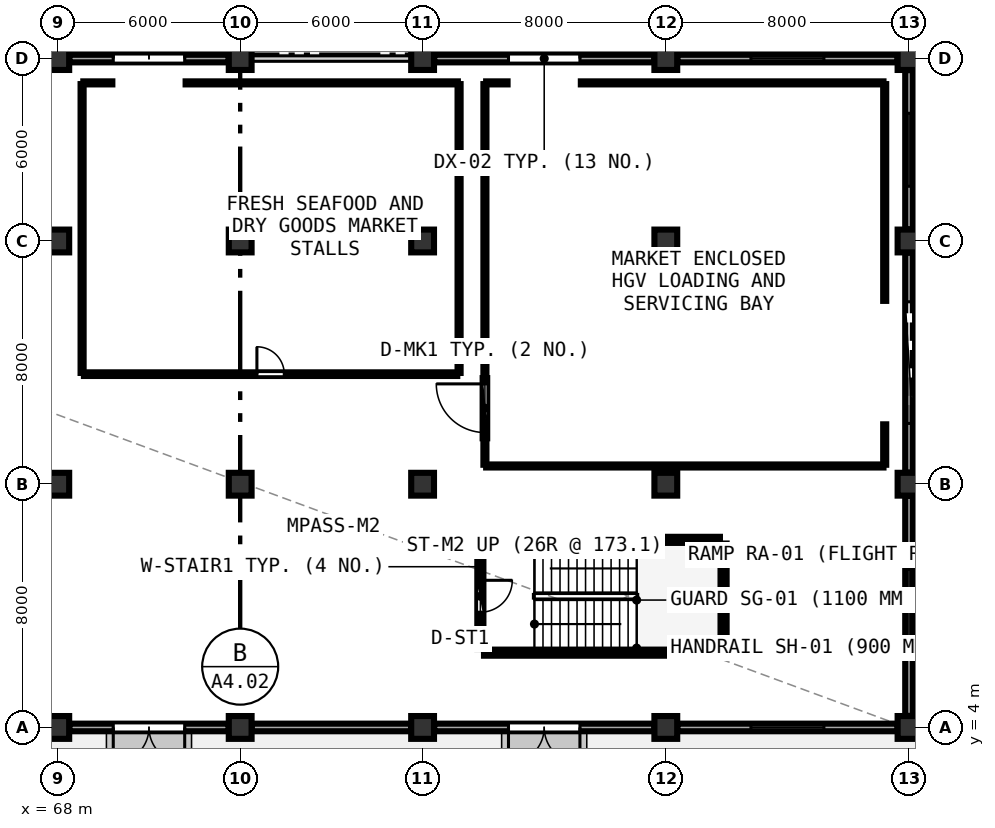
"""IFC4 building model, lengths in metres.
Left out: names, types, materials, properties, quantities, classifications, styles, units other than length and angle.
Written with IfcOpenShell. Run it as: python <this file> out.ifc"""

import sys

from ifc_helpers import new_model, si_unit, direction, frame, frame_2d, origin, origin_2d, place, context, subcontext, project, spatial, rectangle, extrude, element, fill, save


model = new_model("IFC4")
c1 = context("Model", 3, precision=1e-05, world=origin(), true_north=direction((0.0, 1.0)))
c2 = subcontext(c1, "Body", "Model", "MODEL_VIEW")
j1 = project(units=[si_unit("LENGTHUNIT", "METRE"), si_unit("PLANEANGLEUNIT", "RADIAN")], contexts=[c1])
p1 = place(None, origin())
s1 = spatial("IfcSite", under=j1, at=p1, CompositionType="ELEMENT")
p2 = place(p1, origin())
s2 = spatial("IfcBuilding", under=s1, at=p2, CompositionType="ELEMENT")
p3 = place(p2, origin())
s3 = spatial("IfcBuildingStorey", under=s2, at=p3, CompositionType="ELEMENT", Elevation=0.0)
for number, where, z_axis, x_axis in (
    (1, (68.0, 4.0, 0.0), (0.0, 0.0, 1.0), (1.0, 0.0, 0.0)),
    (2, (68.0, 12.0, 0.0), (0.0, 0.0, 1.0), (1.0, 0.0, 0.0)),
    (3, (68.0, 20.0, 0.0), (0.0, 0.0, 1.0), (1.0, 0.0, 0.0)),
    (4, (68.0, 26.0, 0.0), (0.0, 0.0, 1.0), (1.0, 0.0, 0.0)),
    (5, (74.0, 4.0, 0.0), (0.0, 0.0, 1.0), (1.0, 0.0, 0.0)),
    (6, (74.0, 12.0, 0.0), (0.0, 0.0, 1.0), (1.0, 0.0, 0.0)),
    (7, (74.0, 20.0, 0.0), (0.0, 0.0, 1.0), (1.0, 0.0, 0.0)),
    (8, (74.0, 26.0, 0.0), (0.0, 0.0, 1.0), (1.0, 0.0, 0.0)),
    (9, (80.0, 4.0, 0.0), (0.0, 0.0, 1.0), (1.0, 0.0, 0.0)),
    (10, (80.0, 12.0, 0.0), (0.0, 0.0, 1.0), (1.0, 0.0, 0.0)),
    (11, (80.0, 20.0, 0.0), (0.0, 0.0, 1.0), (1.0, 0.0, 0.0)),
    (12, (80.0, 26.0, 0.0), (0.0, 0.0, 1.0), (1.0, 0.0, 0.0)),
    (13, (88.0, 4.0, 0.0), (0.0, 0.0, 1.0), (1.0, 0.0, 0.0)),
    (14, (88.0, 12.0, 0.0), (0.0, 0.0, 1.0), (1.0, 0.0, 0.0)),
    (15, (88.0, 20.0, 0.0), (0.0, 0.0, 1.0), (1.0, 0.0, 0.0)),
    (16, (88.0, 26.0, 0.0), (0.0, 0.0, 1.0), (1.0, 0.0, 0.0)),
    (17, (96.0, 4.0, 0.0), (0.0, 0.0, 1.0), (1.0, 0.0, 0.0)),
    (18, (96.0, 12.0, 0.0), (0.0, 0.0, 1.0), (1.0, 0.0, 0.0)),
    (19, (96.0, 20.0, 0.0), (0.0, 0.0, 1.0), (1.0, 0.0, 0.0)),
    (20, (96.0, 26.0, 0.0), (0.0, 0.0, 1.0), (1.0, 0.0, 0.0)),
):
    element("IfcColumn", number, at=place(p3, frame(where, z_axis=z_axis, x_axis=x_axis)), inside=s3, PredefinedType="COLUMN", context=c2, shape_type="SweptSolid", body=[
        extrude(rectangle(XDim=0.75, YDim=0.75, at=origin_2d()), origin(), (0.0, 0.0, 1.0), 4.5),
    ])
p4 = place(p3, frame((68.38, 4.0, 0.0), z_axis=(0.0, 0.0, 1.0), x_axis=(1.0, 0.0, 0.0)))
e21 = element("IfcWall", 21, at=p4, inside=s3, PredefinedType="SOLIDWALL", context=c2, shape_type="SweptSolid", body=[
    extrude(rectangle(XDim=5.24, YDim=0.25, at=frame_2d((2.62, 0.0))), origin(), (0.0, 0.0, 1.0), 3.42),
])
p5 = place(p4, frame((1.445, 0.0, 0.0)))
e22 = element("IfcOpeningElement", 22, at=p5, cuts=e21, PredefinedType="OPENING", context=c2, shape_type="SweptSolid", body=[
    extrude(rectangle(XDim=2.35, YDim=2.3, at=frame_2d((1.175, 1.15))), frame((0.0, 0.135, 0.0), z_axis=(0.0, -1.0, 0.0), x_axis=(1.0, 0.0, 0.0)), (0.0, 0.0, 1.0), 0.27),
])
p6 = place(p3, frame((74.38, 4.0, 0.0), z_axis=(0.0, 0.0, 1.0), x_axis=(1.0, 0.0, 0.0)))
e23 = element("IfcWall", 23, at=p6, inside=s3, PredefinedType="SOLIDWALL", context=c2, shape_type="SweptSolid", body=[
    extrude(rectangle(XDim=5.24, YDim=0.25, at=frame_2d((2.62, 0.0))), origin(), (0.0, 0.0, 1.0), 3.42),
])
p7 = place(p3, frame((80.38, 4.0, 0.0), z_axis=(0.0, 0.0, 1.0), x_axis=(1.0, 0.0, 0.0)))
e24 = element("IfcWall", 24, at=p7, inside=s3, PredefinedType="SOLIDWALL", context=c2, shape_type="SweptSolid", body=[
    extrude(rectangle(XDim=7.24, YDim=0.25, at=frame_2d((3.62, 0.0))), origin(), (0.0, 0.0, 1.0), 3.42),
])
p8 = place(p7, frame((2.445, 0.0, 0.0)))
e25 = element("IfcOpeningElement", 25, at=p8, cuts=e24, PredefinedType="OPENING", context=c2, shape_type="SweptSolid", body=[
    extrude(rectangle(XDim=2.35, YDim=2.3, at=frame_2d((1.175, 1.15))), frame((0.0, 0.135, 0.0), z_axis=(0.0, -1.0, 0.0), x_axis=(1.0, 0.0, 0.0)), (0.0, 0.0, 1.0), 0.27),
])
p9 = place(p3, frame((88.38, 4.0, 0.0), z_axis=(0.0, 0.0, 1.0), x_axis=(1.0, 0.0, 0.0)))
e26 = element("IfcWall", 26, at=p9, inside=s3, PredefinedType="SOLIDWALL", context=c2, shape_type="SweptSolid", body=[
    extrude(rectangle(XDim=7.24, YDim=0.25, at=frame_2d((3.62, 0.0))), origin(), (0.0, 0.0, 1.0), 3.42),
])
p10 = place(p9, frame((2.42, 0.0, 0.95)))
e27 = element("IfcOpeningElement", 27, at=p10, cuts=e26, PredefinedType="OPENING", context=c2, shape_type="SweptSolid", body=[
    extrude(rectangle(XDim=2.4, YDim=1.65, at=frame_2d((1.2, 0.825))), frame((0.0, 0.135, 0.0), z_axis=(0.0, -1.0, 0.0), x_axis=(1.0, 0.0, 0.0)), (0.0, 0.0, 1.0), 0.27),
])
p11 = place(p3, frame((96.0, 4.38, 0.0), z_axis=(0.0, 0.0, 1.0), x_axis=(0.0, 1.0, 0.0)))
e28 = element("IfcWall", 28, at=p11, inside=s3, PredefinedType="SOLIDWALL", context=c2, shape_type="SweptSolid", body=[
    extrude(rectangle(XDim=7.24, YDim=0.25, at=frame_2d((3.62, 0.0))), origin(), (0.0, 0.0, 1.0), 3.42),
])
p12 = place(p11, frame((2.42, 0.0, 0.95)))
e29 = element("IfcOpeningElement", 29, at=p12, cuts=e28, PredefinedType="OPENING", context=c2, shape_type="SweptSolid", body=[
    extrude(rectangle(XDim=2.4, YDim=1.65, at=frame_2d((1.2, 0.825))), frame((0.0, 0.135, 0.0), z_axis=(0.0, -1.0, 0.0), x_axis=(1.0, 0.0, 0.0)), (0.0, 0.0, 1.0), 0.27),
])
p13 = place(p3, frame((96.0, 12.38, 0.0), z_axis=(0.0, 0.0, 1.0), x_axis=(0.0, 1.0, 0.0)))
e30 = element("IfcWall", 30, at=p13, inside=s3, PredefinedType="SOLIDWALL", context=c2, shape_type="SweptSolid", body=[
    extrude(rectangle(XDim=7.24, YDim=0.25, at=frame_2d((3.62, 0.0))), origin(), (0.0, 0.0, 1.0), 3.42),
])
p14 = place(p13, frame((1.62, 0.0, 0.0)))
e31 = element("IfcOpeningElement", 31, at=p14, cuts=e30, PredefinedType="OPENING", context=c2, shape_type="SweptSolid", body=[
    extrude(rectangle(XDim=4.0, YDim=3.2, at=frame_2d((2.0, 1.6))), frame((0.0, 0.135, 0.0), z_axis=(0.0, -1.0, 0.0), x_axis=(1.0, 0.0, 0.0)), (0.0, 0.0, 1.0), 0.27),
])
p15 = place(p3, frame((96.0, 20.38, 0.0), z_axis=(0.0, 0.0, 1.0), x_axis=(0.0, 1.0, 0.0)))
e32 = element("IfcWall", 32, at=p15, inside=s3, PredefinedType="SOLIDWALL", context=c2, shape_type="SweptSolid", body=[
    extrude(rectangle(XDim=5.24, YDim=0.25, at=frame_2d((2.62, 0.0))), origin(), (0.0, 0.0, 1.0), 3.42),
])
p16 = place(p15, frame((1.42, 0.0, 0.95)))
e33 = element("IfcOpeningElement", 33, at=p16, cuts=e32, PredefinedType="OPENING", context=c2, shape_type="SweptSolid", body=[
    extrude(rectangle(XDim=2.4, YDim=1.65, at=frame_2d((1.2, 0.825))), frame((0.0, 0.135, 0.0), z_axis=(0.0, -1.0, 0.0), x_axis=(1.0, 0.0, 0.0)), (0.0, 0.0, 1.0), 0.27),
])
p17 = place(p3, frame((95.62, 26.0, 0.0), z_axis=(0.0, 0.0, 1.0), x_axis=(-1.0, 0.0, 0.0)))
e34 = element("IfcWall", 34, at=p17, inside=s3, PredefinedType="SOLIDWALL", context=c2, shape_type="SweptSolid", body=[
    extrude(rectangle(XDim=7.24, YDim=0.25, at=frame_2d((3.62, 0.0))), origin(), (0.0, 0.0, 1.0), 3.42),
])
p18 = place(p17, frame((2.42, 0.0, 0.95)))
e35 = element("IfcOpeningElement", 35, at=p18, cuts=e34, PredefinedType="OPENING", context=c2, shape_type="SweptSolid", body=[
    extrude(rectangle(XDim=2.4, YDim=1.65, at=frame_2d((1.2, 0.825))), frame((0.0, 0.135, 0.0), z_axis=(0.0, -1.0, 0.0), x_axis=(1.0, 0.0, 0.0)), (0.0, 0.0, 1.0), 0.27),
])
p19 = place(p3, frame((87.62, 26.0, 0.0), z_axis=(0.0, 0.0, 1.0), x_axis=(-1.0, 0.0, 0.0)))
e36 = element("IfcWall", 36, at=p19, inside=s3, PredefinedType="SOLIDWALL", context=c2, shape_type="SweptSolid", body=[
    extrude(rectangle(XDim=7.24, YDim=0.25, at=frame_2d((3.62, 0.0))), origin(), (0.0, 0.0, 1.0), 3.42),
])
p20 = place(p19, frame((2.445, 0.0, 0.0)))
e37 = element("IfcOpeningElement", 37, at=p20, cuts=e36, PredefinedType="OPENING", context=c2, shape_type="SweptSolid", body=[
    extrude(rectangle(XDim=2.35, YDim=2.3, at=frame_2d((1.175, 1.15))), frame((0.0, 0.135, 0.0), z_axis=(0.0, -1.0, 0.0), x_axis=(1.0, 0.0, 0.0)), (0.0, 0.0, 1.0), 0.27),
])
p21 = place(p3, frame((73.62, 26.0, 0.0), z_axis=(0.0, 0.0, 1.0), x_axis=(-1.0, 0.0, 0.0)))
e38 = element("IfcWall", 38, at=p21, inside=s3, PredefinedType="SOLIDWALL", context=c2, shape_type="SweptSolid", body=[
    extrude(rectangle(XDim=5.24, YDim=0.25, at=frame_2d((2.62, 0.0))), origin(), (0.0, 0.0, 1.0), 3.42),
])
p22 = place(p21, frame((1.445, 0.0, 0.0)))
e39 = element("IfcOpeningElement", 39, at=p22, cuts=e38, PredefinedType="OPENING", context=c2, shape_type="SweptSolid", body=[
    extrude(rectangle(XDim=2.35, YDim=2.3, at=frame_2d((1.175, 1.15))), frame((0.0, 0.135, 0.0), z_axis=(0.0, -1.0, 0.0), x_axis=(1.0, 0.0, 0.0)), (0.0, 0.0, 1.0), 0.27),
])
p23 = place(p3, frame((82.02, 6.46, 0.0), z_axis=(0.0, 0.0, 1.0), x_axis=(1.0, 0.0, 0.0)))
e40 = element("IfcWall", 40, at=p23, inside=s3, PredefinedType="SHEAR", context=c2, shape_type="SweptSolid", body=[
    extrude(rectangle(XDim=7.76, YDim=0.2, at=frame_2d((3.88, 0.0))), origin(), (0.0, 0.0, 1.0), 4.24),
])
p24 = place(p3, frame((89.9, 6.58, 0.0), z_axis=(0.0, 0.0, 1.0), x_axis=(0.0, 1.0, 0.0)))
e41 = element("IfcWall", 41, at=p24, inside=s3, PredefinedType="SHEAR", context=c2, shape_type="SweptSolid", body=[
    extrude(rectangle(XDim=3.47, YDim=0.2, at=frame_2d((1.735, 0.0))), origin(), (0.0, 0.0, 1.0), 4.24),
])
p25 = place(p3, frame((89.78, 10.17, 0.0), z_axis=(0.0, 0.0, 1.0), x_axis=(-1.0, 0.0, 0.0)))
e42 = element("IfcWall", 42, at=p25, inside=s3, PredefinedType="SHEAR", context=c2, shape_type="SweptSolid", body=[
    extrude(rectangle(XDim=7.76, YDim=0.2, at=frame_2d((3.88, 0.0))), origin(), (0.0, 0.0, 1.0), 4.24),
])
p26 = place(p3, frame((81.9, 10.05, 0.0), z_axis=(0.0, 0.0, 1.0), x_axis=(0.0, -1.0, 0.0)))
e43 = element("IfcWall", 43, at=p26, inside=s3, PredefinedType="SHEAR", context=c2, shape_type="SweptSolid", body=[
    extrude(rectangle(XDim=3.47, YDim=0.2, at=frame_2d((1.735, 0.0))), origin(), (0.0, 0.0, 1.0), 4.24),
])
p27 = place(p26, frame((1.21, 0.0, 0.0)))
e44 = element("IfcOpeningElement", 44, at=p27, cuts=e43, PredefinedType="OPENING", context=c2, shape_type="SweptSolid", body=[
    extrude(rectangle(XDim=1.05, YDim=2.1, at=frame_2d((0.525, 1.05))), frame((0.0, 0.11, 0.0), z_axis=(0.0, -1.0, 0.0), x_axis=(1.0, 0.0, 0.0)), (0.0, 0.0, 1.0), 0.22),
])
p28 = place(p3, frame((68.86, 15.62, 0.0), z_axis=(0.0, 0.0, 1.0), x_axis=(1.0, 0.0, 0.0)))
e45 = element("IfcWall", 45, at=p28, inside=s3, PredefinedType="PARTITIONING", context=c2, shape_type="SweptSolid", body=[
    extrude(rectangle(XDim=12.28, YDim=0.12, at=frame_2d((6.14, 0.0))), origin(), (0.0, 0.0, 1.0), 3.425),
])
p29 = place(p28, frame((5.69, 0.0, 0.0)))
e46 = element("IfcOpeningElement", 46, at=p29, cuts=e45, PredefinedType="OPENING", context=c2, shape_type="SweptSolid", body=[
    extrude(rectangle(XDim=0.9, YDim=2.08, at=frame_2d((0.45, 1.04))), frame((0.0, 0.07, 0.0), z_axis=(0.0, -1.0, 0.0), x_axis=(1.0, 0.0, 0.0)), (0.0, 0.0, 1.0), 0.14),
])
p30 = place(p3, frame((82.05, 13.51, 0.0), z_axis=(0.0, 0.0, 1.0), x_axis=(0.0, 1.0, 0.0)))
e47 = element("IfcWall", 47, at=p30, inside=s3, PredefinedType="PARTITIONING", context=c2, shape_type="SweptSolid", body=[
    extrude(rectangle(XDim=1.98, YDim=0.15, at=frame_2d((0.99, 0.0))), origin(), (0.0, 0.0, 1.0), 4.19),
])
p31 = place(p30, frame((0.19, 0.0, 0.0)))
e48 = element("IfcOpeningElement", 48, at=p31, cuts=e47, PredefinedType="OPENING", context=c2, shape_type="SweptSolid", body=[
    extrude(rectangle(XDim=1.6, YDim=2.15, at=frame_2d((0.8, 1.075))), frame((0.0, 0.085, 0.0), z_axis=(0.0, -1.0, 0.0), x_axis=(1.0, 0.0, 0.0)), (0.0, 0.0, 1.0), 0.17),
])
p32 = place(p3, frame((81.2, 15.66, 0.0), z_axis=(0.0, 0.0, 1.0), x_axis=(0.0, 1.0, 0.0)))
e49 = element("IfcWall", 49, at=p32, inside=s3, PredefinedType="PARTITIONING", context=c2, shape_type="SweptSolid", body=[
    extrude(rectangle(XDim=9.5, YDim=0.1, at=frame_2d((4.75, 0.0))), origin(), (0.0, 0.0, 1.0), 3.425),
])
p33 = place(p3, frame((81.16, 25.2, 0.0), z_axis=(0.0, 0.0, 1.0), x_axis=(-1.0, 0.0, 0.0)))
e50 = element("IfcWall", 50, at=p33, inside=s3, PredefinedType="PARTITIONING", context=c2, shape_type="SweptSolid", body=[
    extrude(rectangle(XDim=8.955, YDim=0.1, at=frame_2d((4.478, 0.0))), origin(), (0.0, 0.0, 1.0), 3.425),
])
p34 = place(p3, frame((69.795, 25.2, 0.0), z_axis=(0.0, 0.0, 1.0), x_axis=(-1.0, 0.0, 0.0)))
e51 = element("IfcWall", 51, at=p34, inside=s3, PredefinedType="PARTITIONING", context=c2, shape_type="SweptSolid", body=[
    extrude(rectangle(XDim=0.955, YDim=0.1, at=frame_2d((0.478, 0.0))), origin(), (0.0, 0.0, 1.0), 4.19),
])
p35 = place(p3, frame((68.8, 25.16, 0.0), z_axis=(0.0, 0.0, 1.0), x_axis=(0.0, -1.0, 0.0)))
e52 = element("IfcWall", 52, at=p35, inside=s3, PredefinedType="PARTITIONING", context=c2, shape_type="SweptSolid", body=[
    extrude(rectangle(XDim=9.5, YDim=0.1, at=frame_2d((4.75, 0.0))), origin(), (0.0, 0.0, 1.0), 3.425),
])
p36 = place(p3, frame((82.09, 12.6, 0.0), z_axis=(0.0, 0.0, 1.0), x_axis=(1.0, 0.0, 0.0)))
e53 = element("IfcWall", 53, at=p36, inside=s3, PredefinedType="PARTITIONING", context=c2, shape_type="SweptSolid", body=[
    extrude(rectangle(XDim=13.07, YDim=0.1, at=frame_2d((6.535, 0.0))), origin(), (0.0, 0.0, 1.0), 3.425),
])
p37 = place(p3, frame((95.2, 12.64, 0.0), z_axis=(0.0, 0.0, 1.0), x_axis=(0.0, 1.0, 0.0)))
e54 = element("IfcWall", 54, at=p37, inside=s3, PredefinedType="PARTITIONING", context=c2, shape_type="SweptSolid", body=[
    extrude(rectangle(XDim=1.33, YDim=0.1, at=frame_2d((0.665, 0.0))), origin(), (0.0, 0.0, 1.0), 4.19),
])
p38 = place(p3, frame((95.2, 18.03, 0.0), z_axis=(0.0, 0.0, 1.0), x_axis=(0.0, 1.0, 0.0)))
e55 = element("IfcWall", 55, at=p38, inside=s3, PredefinedType="PARTITIONING", context=c2, shape_type="SweptSolid", body=[
    extrude(rectangle(XDim=7.13, YDim=0.1, at=frame_2d((3.565, 0.0))), origin(), (0.0, 0.0, 1.0), 3.425),
])
p39 = place(p3, frame((95.16, 25.2, 0.0), z_axis=(0.0, 0.0, 1.0), x_axis=(-1.0, 0.0, 0.0)))
e56 = element("IfcWall", 56, at=p39, inside=s3, PredefinedType="PARTITIONING", context=c2, shape_type="SweptSolid", body=[
    extrude(rectangle(XDim=9.955, YDim=0.1, at=frame_2d((4.978, 0.0))), origin(), (0.0, 0.0, 1.0), 3.425),
])
p40 = place(p3, frame((82.795, 25.2, 0.0), z_axis=(0.0, 0.0, 1.0), x_axis=(-1.0, 0.0, 0.0)))
e57 = element("IfcWall", 57, at=p40, inside=s3, PredefinedType="PARTITIONING", context=c2, shape_type="SweptSolid", body=[
    extrude(rectangle(XDim=0.705, YDim=0.1, at=frame_2d((0.353, 0.0))), origin(), (0.0, 0.0, 1.0), 4.19),
])
p41 = place(p3, frame((82.05, 25.16, 0.0), z_axis=(0.0, 0.0, 1.0), x_axis=(0.0, -1.0, 0.0)))
e58 = element("IfcWall", 58, at=p41, inside=s3, PredefinedType="PARTITIONING", context=c2, shape_type="SweptSolid", body=[
    extrude(rectangle(XDim=9.67, YDim=0.1, at=frame_2d((4.835, 0.0))), origin(), (0.0, 0.0, 1.0), 3.425),
])
p42 = place(p3, frame((82.05, 13.51, 0.0), z_axis=(0.0, 0.0, 1.0), x_axis=(0.0, -1.0, 0.0)))
e59 = element("IfcWall", 59, at=p42, inside=s3, PredefinedType="PARTITIONING", context=c2, shape_type="SweptSolid", body=[
    extrude(rectangle(XDim=0.87, YDim=0.1, at=frame_2d((0.435, 0.0))), origin(), (0.0, 0.0, 1.0), 4.19),
])
p43 = place(p5, frame((2.35, 0.0, 0.0), z_axis=(0.0, 0.0, 1.0), x_axis=(-1.0, 0.0, 0.0)))
e60 = element("IfcDoor", 60, at=p43, inside=s3, OperationType="DOUBLE_DOOR_SINGLE_SWING", PredefinedType="DOOR", context=c2, shape_type="SweptSolid", body=[
    extrude(rectangle(XDim=2.35, YDim=2.3, at=frame_2d((1.175, 1.15))), frame((0.0, 0.025, 0.0), z_axis=(0.0, -1.0, 0.0), x_axis=(1.0, 0.0, 0.0)), (0.0, 0.0, 1.0), 0.05),
])
fill(e22, e60)
p44 = place(p8, frame((2.35, 0.0, 0.0), z_axis=(0.0, 0.0, 1.0), x_axis=(-1.0, 0.0, 0.0)))
e61 = element("IfcDoor", 61, at=p44, inside=s3, OperationType="DOUBLE_DOOR_SINGLE_SWING", PredefinedType="DOOR", context=c2, shape_type="SweptSolid", body=[
    extrude(rectangle(XDim=2.35, YDim=2.3, at=frame_2d((1.175, 1.15))), frame((0.0, 0.025, 0.0), z_axis=(0.0, -1.0, 0.0), x_axis=(1.0, 0.0, 0.0)), (0.0, 0.0, 1.0), 0.05),
])
fill(e25, e61)
p45 = place(p10, origin())
e62 = element("IfcWindow", 62, at=p45, inside=s3, PartitioningType="SINGLE_PANEL", PredefinedType="WINDOW", context=c2, shape_type="SweptSolid", body=[
    extrude(rectangle(XDim=2.4, YDim=1.65, at=frame_2d((1.2, 0.825))), frame((0.0, 0.03, 0.0), z_axis=(0.0, -1.0, 0.0), x_axis=(1.0, 0.0, 0.0)), (0.0, 0.0, 1.0), 0.06),
])
fill(e27, e62)
p46 = place(p12, origin())
e63 = element("IfcWindow", 63, at=p46, inside=s3, PartitioningType="SINGLE_PANEL", PredefinedType="WINDOW", context=c2, shape_type="SweptSolid", body=[
    extrude(rectangle(XDim=2.4, YDim=1.65, at=frame_2d((1.2, 0.825))), frame((0.0, 0.03, 0.0), z_axis=(0.0, -1.0, 0.0), x_axis=(1.0, 0.0, 0.0)), (0.0, 0.0, 1.0), 0.06),
])
fill(e29, e63)
p47 = place(p14, frame((4.0, 0.0, 0.0), z_axis=(0.0, 0.0, 1.0), x_axis=(-1.0, 0.0, 0.0)))
e64 = element("IfcDoor", 64, at=p47, inside=s3, OperationType="ROLLINGUP", PredefinedType="GATE", context=c2, shape_type="SweptSolid", body=[
    extrude(rectangle(XDim=4.0, YDim=3.2, at=frame_2d((2.0, 1.6))), frame((0.0, 0.025, 0.0), z_axis=(0.0, -1.0, 0.0), x_axis=(1.0, 0.0, 0.0)), (0.0, 0.0, 1.0), 0.05),
])
fill(e31, e64)
p48 = place(p16, origin())
e65 = element("IfcWindow", 65, at=p48, inside=s3, PartitioningType="SINGLE_PANEL", PredefinedType="WINDOW", context=c2, shape_type="SweptSolid", body=[
    extrude(rectangle(XDim=2.4, YDim=1.65, at=frame_2d((1.2, 0.825))), frame((0.0, 0.03, 0.0), z_axis=(0.0, -1.0, 0.0), x_axis=(1.0, 0.0, 0.0)), (0.0, 0.0, 1.0), 0.06),
])
fill(e33, e65)
p49 = place(p18, origin())
e66 = element("IfcWindow", 66, at=p49, inside=s3, PartitioningType="SINGLE_PANEL", PredefinedType="WINDOW", context=c2, shape_type="SweptSolid", body=[
    extrude(rectangle(XDim=2.4, YDim=1.65, at=frame_2d((1.2, 0.825))), frame((0.0, 0.03, 0.0), z_axis=(0.0, -1.0, 0.0), x_axis=(1.0, 0.0, 0.0)), (0.0, 0.0, 1.0), 0.06),
])
fill(e35, e66)
p50 = place(p20, frame((2.35, 0.0, 0.0), z_axis=(0.0, 0.0, 1.0), x_axis=(-1.0, 0.0, 0.0)))
e67 = element("IfcDoor", 67, at=p50, inside=s3, OperationType="DOUBLE_DOOR_SINGLE_SWING", PredefinedType="DOOR", context=c2, shape_type="SweptSolid", body=[
    extrude(rectangle(XDim=2.35, YDim=2.3, at=frame_2d((1.175, 1.15))), frame((0.0, 0.025, 0.0), z_axis=(0.0, -1.0, 0.0), x_axis=(1.0, 0.0, 0.0)), (0.0, 0.0, 1.0), 0.05),
])
fill(e37, e67)
p51 = place(p22, frame((2.35, 0.0, 0.0), z_axis=(0.0, 0.0, 1.0), x_axis=(-1.0, 0.0, 0.0)))
e68 = element("IfcDoor", 68, at=p51, inside=s3, OperationType="DOUBLE_DOOR_SINGLE_SWING", PredefinedType="DOOR", context=c2, shape_type="SweptSolid", body=[
    extrude(rectangle(XDim=2.35, YDim=2.3, at=frame_2d((1.175, 1.15))), frame((0.0, 0.025, 0.0), z_axis=(0.0, -1.0, 0.0), x_axis=(1.0, 0.0, 0.0)), (0.0, 0.0, 1.0), 0.05),
])
fill(e39, e68)
p52 = place(p27, origin())
e69 = element("IfcDoor", 69, at=p52, inside=s3, OperationType="SINGLE_SWING_LEFT", PredefinedType="DOOR", context=c2, shape_type="SweptSolid", body=[
    extrude(rectangle(XDim=1.05, YDim=2.1, at=frame_2d((0.525, 1.05))), frame((0.0, 0.025, 0.0), z_axis=(0.0, -1.0, 0.0), x_axis=(1.0, 0.0, 0.0)), (0.0, 0.0, 1.0), 0.05),
])
fill(e44, e69)
p53 = place(p29, origin())
e70 = element("IfcDoor", 70, at=p53, inside=s3, OperationType="SINGLE_SWING_LEFT", PredefinedType="DOOR", context=c2, shape_type="SweptSolid", body=[
    extrude(rectangle(XDim=0.9, YDim=2.08, at=frame_2d((0.45, 1.04))), frame((0.0, 0.025, 0.0), z_axis=(0.0, -1.0, 0.0), x_axis=(1.0, 0.0, 0.0)), (0.0, 0.0, 1.0), 0.05),
])
fill(e46, e70)
p54 = place(p31, origin())
e71 = element("IfcDoor", 71, at=p54, inside=s3, OperationType="SINGLE_SWING_RIGHT", PredefinedType="DOOR", context=c2, shape_type="SweptSolid", body=[
    extrude(rectangle(XDim=1.6, YDim=2.15, at=frame_2d((0.8, 1.075))), frame((0.0, 0.025, 0.0), z_axis=(0.0, -1.0, 0.0), x_axis=(1.0, 0.0, 0.0)), (0.0, 0.0, 1.0), 0.05),
])
fill(e48, e71)
save(model, sys.argv[1])
